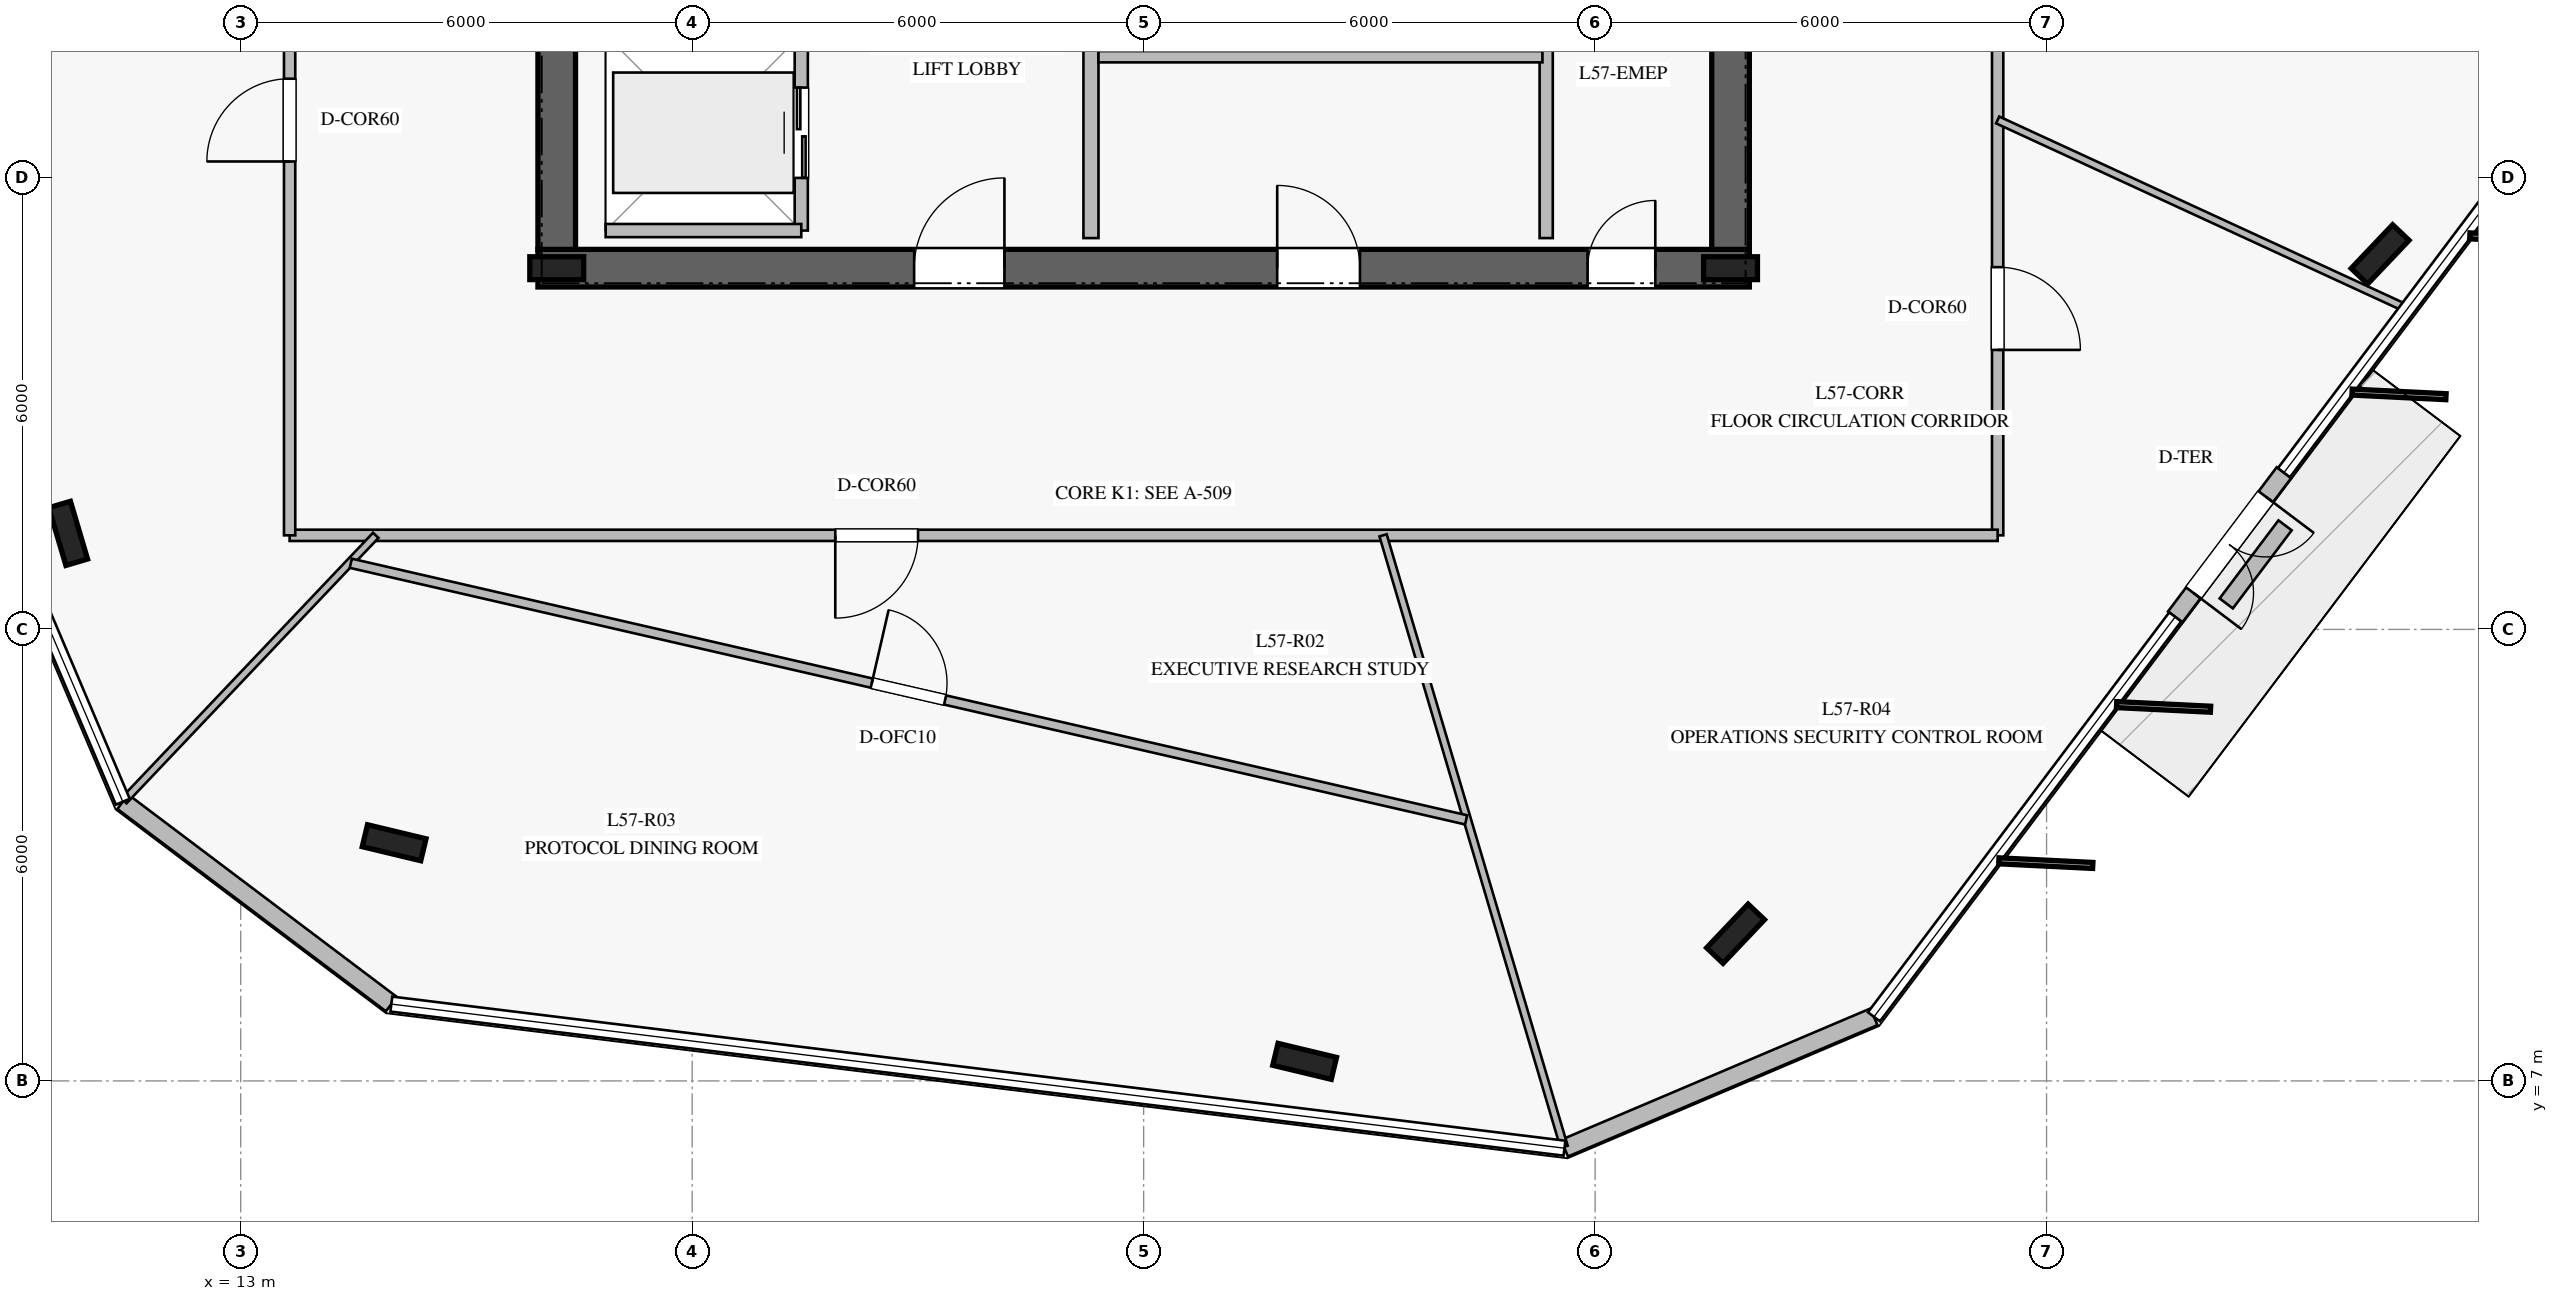
"""IFC4 building model, lengths in metres.
Left out: names, types, materials, properties, quantities, classifications, styles, units other than length and angle.
Written with IfcOpenShell. Run it as: python <this file> out.ifc"""

import sys

from ifc_helpers import new_model, si_unit, direction, frame, frame_2d, origin, origin_2d, place, context, subcontext, project, spatial, rectangle, i_section, extrude, element, fill, save


model = new_model("IFC4")
c1 = context("Model", 3, precision=1e-05, world=origin(), true_north=direction((0.0, 1.0)))
c2 = subcontext(c1, "Body", "Model", "MODEL_VIEW")
j1 = project(units=[si_unit("LENGTHUNIT", "METRE"), si_unit("PLANEANGLEUNIT", "RADIAN")], contexts=[c1])
p1 = place(None, origin())
s1 = spatial("IfcSite", under=j1, at=p1, CompositionType="ELEMENT")
p2 = place(p1, origin())
s2 = spatial("IfcBuilding", under=s1, at=p2, CompositionType="ELEMENT")
p3 = place(p2, frame((0.0, 0.0, 236.8)))
s3 = spatial("IfcBuildingStorey", under=s2, at=p3, CompositionType="ELEMENT", Elevation=236.8)
p4 = place(p3, frame((16.95, 17.8, 0.0), z_axis=(0.0, 0.0, 1.0), x_axis=(1.0, 0.0, 0.0)))
e1 = element("IfcWall", 1, at=p4, inside=s3, PredefinedType="SHEAR", context=c2, shape_type="SweptSolid", body=[
    extrude(rectangle(XDim=16.1, YDim=0.5, at=frame_2d((8.05, 0.0))), origin(), (0.0, 0.0, 1.0), 3.78),
])
p5 = place(p4, frame((5.0, 0.0, 0.0)))
e2 = element("IfcOpeningElement", 2, at=p5, cuts=e1, PredefinedType="OPENING", context=c2, shape_type="SweptSolid", body=[
    extrude(rectangle(XDim=1.2, YDim=2.25, at=frame_2d((0.6, 1.125))), frame((0.0, 0.26, 0.0), z_axis=(0.0, -1.0, 0.0), x_axis=(1.0, 0.0, 0.0)), (0.0, 0.0, 1.0), 0.52),
])
p6 = place(p4, frame((13.95, 0.0, 0.0)))
e3 = element("IfcOpeningElement", 3, at=p6, cuts=e1, PredefinedType="OPENING", context=c2, shape_type="SweptSolid", body=[
    extrude(rectangle(XDim=0.9, YDim=2.1, at=frame_2d((0.45, 1.05))), frame((0.0, 0.26, 0.0), z_axis=(0.0, -1.0, 0.0), x_axis=(1.0, 0.0, 0.0)), (0.0, 0.0, 1.0), 0.52),
])
p7 = place(p4, frame((9.825, 0.0, 0.0)))
e4 = element("IfcOpeningElement", 4, at=p7, cuts=e1, PredefinedType="OPENING", context=c2, shape_type="SweptSolid", body=[
    extrude(rectangle(XDim=1.1, YDim=2.2, at=frame_2d((0.55, 1.1))), frame((0.0, 0.26, 0.0), z_axis=(0.0, -1.0, 0.0), x_axis=(1.0, 0.0, 0.0)), (0.0, 0.0, 1.0), 0.52),
])
p8 = place(p3, frame((17.2, 31.95, 0.0), z_axis=(0.0, 0.0, 1.0), x_axis=(0.0, -1.0, 0.0)))
e5 = element("IfcWall", 5, at=p8, inside=s3, PredefinedType="SHEAR", context=c2, shape_type="SweptSolid", body=[
    extrude(rectangle(XDim=13.9, YDim=0.5, at=frame_2d((6.95, 0.0))), origin(), (0.0, 0.0, 1.0), 3.78),
])
p9 = place(p8, frame((2.1, 0.0, 0.0)))
e6 = element("IfcOpeningElement", 6, at=p9, cuts=e5, PredefinedType="OPENING", context=c2, shape_type="SweptSolid", body=[
    extrude(rectangle(XDim=1.5, YDim=2.2, at=frame_2d((0.75, 1.1))), frame((0.0, 0.26, 0.0), z_axis=(0.0, -1.0, 0.0), x_axis=(1.0, 0.0, 0.0)), (0.0, 0.0, 1.0), 0.52),
])
p10 = place(p3, frame((32.8, 18.05, 0.0), z_axis=(0.0, 0.0, 1.0), x_axis=(0.0, 1.0, 0.0)))
e7 = element("IfcWall", 7, at=p10, inside=s3, PredefinedType="SHEAR", context=c2, shape_type="SweptSolid", body=[
    extrude(rectangle(XDim=13.9, YDim=0.5, at=frame_2d((6.95, 0.0))), origin(), (0.0, 0.0, 1.0), 3.78),
])
for number, where, z_axis, x_axis in (
    (8, (17.2, 17.8, 0.0), (0.0, 0.0, 1.0), (1.0, 0.0, 0.0)),
    (9, (32.8, 17.8, 0.0), (0.0, 0.0, 1.0), (1.0, 0.0, 0.0)),
):
    element("IfcColumn", number, at=place(p3, frame(where, z_axis=z_axis, x_axis=x_axis)), inside=s3, PredefinedType="COLUMN", context=c2, shape_type="SweptSolid", body=[
        extrude(i_section(OverallWidth=0.304, OverallDepth=0.716, WebThickness=0.021, FlangeThickness=0.04, at=origin_2d()), origin(), (0.0, 0.0, 1.0), 4.0),
    ])
for number, where, z_axis, x_axis in (
    (10, (10.707, 14.276, 0.0), (0.0, 0.0, 1.0), (-0.284, 0.959, 0.0)),
    (11, (15.039, 10.165, 0.0), (0.0, 0.0, 1.0), (-0.972, 0.233, 0.0)),
    (12, (27.14, 7.26, 0.0), (0.0, 0.0, 1.0), (-0.972, 0.233, 0.0)),
    (13, (32.867, 8.956, 0.0), (0.0, 0.0, 1.0), (0.688, 0.725, 0.0)),
    (14, (41.433, 17.984, 0.0), (0.0, 0.0, 1.0), (0.688, 0.725, 0.0)),
):
    element("IfcColumn", number, at=place(p3, frame(where, z_axis=z_axis, x_axis=x_axis)), inside=s3, PredefinedType="COLUMN", context=c2, shape_type="SweptSolid", body=[
        extrude(i_section(OverallWidth=0.3, OverallDepth=0.8, WebThickness=0.018, FlangeThickness=0.033, at=origin_2d()), origin(), (0.0, 0.0, 1.0), 4.0),
    ])
p11 = place(p3, frame((11.433, 10.71, 0.0), z_axis=(0.0, 0.0, 1.0), x_axis=(0.798673666817, -0.601764384069, 0.0)))
e15 = element("IfcWall", 15, at=p11, inside=s3, PredefinedType="STANDARD", context=c2, shape_type="SweptSolid", body=[
    extrude(rectangle(XDim=4.469, YDim=0.24, at=frame_2d((2.234, 0.0))), origin(), (0.0, 0.0, 1.0), 3.78),
])
p12 = place(p3, frame((30.593, 6.106, 0.0), z_axis=(0.0, 0.0, 1.0), x_axis=(0.92048770115, 0.390771534316, 0.0)))
e16 = element("IfcWall", 16, at=p12, inside=s3, PredefinedType="STANDARD", context=c2, shape_type="SweptSolid", body=[
    extrude(rectangle(XDim=4.468, YDim=0.24, at=frame_2d((2.234, 0.0))), origin(), (0.0, 0.0, 1.0), 3.78),
])
p13 = place(p3, frame((38.71, 13.166, 0.0), z_axis=(0.0, 0.0, 1.0), x_axis=(0.601950815561, 0.798533165025, 0.0)))
e17 = element("IfcWall", 17, at=p13, inside=s3, PredefinedType="STANDARD", context=c2, shape_type="SweptSolid", body=[
    extrude(rectangle(XDim=2.401, YDim=0.24, at=frame_2d((1.2, 0.0))), origin(), (0.0, 0.0, 1.0), 3.78),
])
p14 = place(p13, frame((0.4, 0.0, 0.0)))
e18 = element("IfcOpeningElement", 18, at=p14, cuts=e17, PredefinedType="OPENING", context=c2, shape_type="SweptSolid", body=[
    extrude(rectangle(XDim=1.6, YDim=2.25, at=frame_2d((0.8, 1.125))), frame((0.0, 0.13, 0.0), z_axis=(0.0, -1.0, 0.0), x_axis=(1.0, 0.0, 0.0)), (0.0, 0.0, 1.0), 0.26),
])
p15 = place(p3, frame((39.388, 13.345, 0.0), z_axis=(0.0, 0.0, 1.0), x_axis=(0.601681803176, 0.798735881081, 0.0)))
e19 = element("IfcWall", 19, at=p15, inside=s3, PredefinedType="USERDEFINED", context=c2, shape_type="SweptSolid", body=[
    extrude(rectangle(XDim=1.3, YDim=0.22, at=frame_2d((0.65, 0.0))), origin(), (0.0, 0.0, 1.0), 0.4),
])
p16 = place(p3, frame((24.3, 18.2, 0.0), z_axis=(0.0, 0.0, 1.0), x_axis=(0.0, 1.0, 0.0)))
e20 = element("IfcWall", 20, at=p16, inside=s3, PredefinedType="PARTITIONING", context=c2, shape_type="SweptSolid", body=[
    extrude(rectangle(XDim=5.15, YDim=0.2, at=frame_2d((2.575, 0.0))), origin(), (0.0, 0.0, 1.0), 3.78),
])
p17 = place(p3, frame((30.35, 18.2, 0.0), z_axis=(0.0, 0.0, 1.0), x_axis=(0.0, 1.0, 0.0)))
e21 = element("IfcWall", 21, at=p17, inside=s3, PredefinedType="PARTITIONING", context=c2, shape_type="SweptSolid", body=[
    extrude(rectangle(XDim=3.48, YDim=0.175, at=frame_2d((1.74, 0.0))), origin(), (0.0, 0.0, 1.0), 3.78),
])
p18 = place(p3, frame((24.4, 20.61, 0.0), z_axis=(0.0, 0.0, 1.0), x_axis=(1.0, 0.0, 0.0)))
e22 = element("IfcWall", 22, at=p18, inside=s3, PredefinedType="PARTITIONING", context=c2, shape_type="SweptSolid", body=[
    extrude(rectangle(XDim=5.9, YDim=0.15, at=frame_2d((2.95, 0.0))), origin(), (0.0, 0.0, 1.0), 3.78),
])
p19 = place(p3, frame((20.45, 18.3, 0.0), z_axis=(0.0, 0.0, 1.0), x_axis=(0.0, 1.0, 0.0)))
e23 = element("IfcWall", 23, at=p19, inside=s3, PredefinedType="PARTITIONING", context=c2, shape_type="SweptSolid", body=[
    extrude(rectangle(XDim=2.6, YDim=0.175, at=frame_2d((1.3, 0.0))), origin(), (0.0, 0.0, 1.0), 3.78),
])
p20 = place(p19, frame((0.7, 0.0, 0.0)))
e24 = element("IfcOpeningElement", 24, at=p20, cuts=e23, PredefinedType="OPENING", context=c2, shape_type="SweptSolid", body=[
    extrude(rectangle(XDim=1.2, YDim=2.2, at=frame_2d((0.6, 1.1))), frame((0.0, 0.098, 0.0), z_axis=(0.0, -1.0, 0.0), x_axis=(1.0, 0.0, 0.0)), (0.0, 0.0, 1.0), 0.195),
])
p21 = place(p3, frame((17.85, 18.3, 0.0), z_axis=(0.0, 0.0, 1.0), x_axis=(1.0, 0.0, 0.0)))
e25 = element("IfcWall", 25, at=p21, inside=s3, PredefinedType="PARTITIONING", context=c2, shape_type="SweptSolid", body=[
    extrude(rectangle(XDim=2.6, YDim=0.175, at=frame_2d((1.3, 0.0))), origin(), (0.0, 0.0, 1.0), 3.78),
])
p22 = place(p3, frame((36.35, 35.75, 0.0), z_axis=(0.0, 0.0, 1.0), x_axis=(0.0, -1.0, 0.0)))
e26 = element("IfcWall", 26, at=p22, inside=s3, PredefinedType="PARTITIONING", context=c2, shape_type="SweptSolid", body=[
    extrude(rectangle(XDim=21.5, YDim=0.15, at=frame_2d((10.75, 0.0))), origin(), (0.0, 0.0, 1.0), 3.02),
])
p23 = place(p22, frame((17.936, 0.0, 0.0)))
e27 = element("IfcOpeningElement", 27, at=p23, cuts=e26, PredefinedType="OPENING", context=c2, shape_type="SweptSolid", body=[
    extrude(rectangle(XDim=1.1, YDim=2.2, at=frame_2d((0.55, 1.1))), frame((0.0, 0.085, 0.0), z_axis=(0.0, -1.0, 0.0), x_axis=(1.0, 0.0, 0.0)), (0.0, 0.0, 1.0), 0.17),
])
p24 = place(p22, frame((9.363, 0.0, 0.0)))
e28 = element("IfcOpeningElement", 28, at=p24, cuts=e26, PredefinedType="OPENING", context=c2, shape_type="SweptSolid", body=[
    extrude(rectangle(XDim=1.1, YDim=2.2, at=frame_2d((0.55, 1.1))), frame((0.0, 0.085, 0.0), z_axis=(0.0, -1.0, 0.0), x_axis=(1.0, 0.0, 0.0)), (0.0, 0.0, 1.0), 0.17),
])
p25 = place(p3, frame((36.35, 14.25, 0.0), z_axis=(0.0, 0.0, 1.0), x_axis=(-1.0, 0.0, 0.0)))
e29 = element("IfcWall", 29, at=p25, inside=s3, PredefinedType="PARTITIONING", context=c2, shape_type="SweptSolid", body=[
    extrude(rectangle(XDim=22.7, YDim=0.15, at=frame_2d((11.35, 0.0))), origin(), (0.0, 0.0, 1.0), 3.02),
])
p26 = place(p25, frame((14.348, 0.0, 0.0)))
e30 = element("IfcOpeningElement", 30, at=p26, cuts=e29, PredefinedType="OPENING", context=c2, shape_type="SweptSolid", body=[
    extrude(rectangle(XDim=1.1, YDim=2.2, at=frame_2d((0.55, 1.1))), frame((0.0, 0.085, 0.0), z_axis=(0.0, -1.0, 0.0), x_axis=(1.0, 0.0, 0.0)), (0.0, 0.0, 1.0), 0.17),
])
p27 = place(p3, frame((13.65, 14.25, 0.0), z_axis=(0.0, 0.0, 1.0), x_axis=(0.0, 1.0, 0.0)))
e31 = element("IfcWall", 31, at=p27, inside=s3, PredefinedType="PARTITIONING", context=c2, shape_type="SweptSolid", body=[
    extrude(rectangle(XDim=21.5, YDim=0.15, at=frame_2d((10.75, 0.0))), origin(), (0.0, 0.0, 1.0), 3.28),
])
p28 = place(p27, frame((4.968, 0.0, 0.0)))
e32 = element("IfcOpeningElement", 32, at=p28, cuts=e31, PredefinedType="OPENING", context=c2, shape_type="SweptSolid", body=[
    extrude(rectangle(XDim=1.1, YDim=2.2, at=frame_2d((0.55, 1.1))), frame((0.0, 0.085, 0.0), z_axis=(0.0, -1.0, 0.0), x_axis=(1.0, 0.0, 0.0)), (0.0, 0.0, 1.0), 0.17),
])
p29 = place(p27, frame((15.44, 0.0, 0.0)))
e33 = element("IfcOpeningElement", 33, at=p29, cuts=e31, PredefinedType="OPENING", context=c2, shape_type="SweptSolid", body=[
    extrude(rectangle(XDim=1.1, YDim=2.2, at=frame_2d((0.55, 1.1))), frame((0.0, 0.085, 0.0), z_axis=(0.0, -1.0, 0.0), x_axis=(1.0, 0.0, 0.0)), (0.0, 0.0, 1.0), 0.17),
])
p30 = place(p3, frame((14.795, 14.25, 0.0), z_axis=(0.0, 0.0, 1.0), x_axis=(-0.688547593197, -0.725191155422, 0.0)))
e34 = element("IfcWall", 34, at=p30, inside=s3, PredefinedType="MOVABLE", context=c2, shape_type="SweptSolid", body=[
    extrude(rectangle(XDim=4.864, YDim=0.1, at=frame_2d((2.432, 0.0))), origin(), (0.0, 0.0, 1.0), 3.18),
])
p31 = place(p3, frame((28.182, 14.25, 0.0), z_axis=(0.0, 0.0, 1.0), x_axis=(0.28390490375, -0.958852442051, 0.0)))
e35 = element("IfcWall", 35, at=p31, inside=s3, PredefinedType="MOVABLE", context=c2, shape_type="SweptSolid", body=[
    extrude(rectangle(XDim=8.475, YDim=0.1, at=frame_2d((4.237, 0.0))), origin(), (0.0, 0.0, 1.0), 3.05),
])
p32 = place(p3, frame((36.35, 19.77, 0.0), z_axis=(0.0, 0.0, 1.0), x_axis=(0.90822453429, -0.418483207923, 0.0)))
e36 = element("IfcWall", 36, at=p32, inside=s3, PredefinedType="MOVABLE", context=c2, shape_type="SweptSolid", body=[
    extrude(rectangle(XDim=5.979, YDim=0.1, at=frame_2d((2.989, 0.0))), origin(), (0.0, 0.0, 1.0), 3.18),
])
p33 = place(p3, frame((14.463, 13.879, 0.0), z_axis=(0.0, 0.0, 1.0), x_axis=(0.974546244814, -0.224186566768, 0.0)))
e37 = element("IfcWall", 37, at=p33, inside=s3, PredefinedType="PARTITIONING", context=c2, shape_type="SweptSolid", body=[
    extrude(rectangle(XDim=15.21, YDim=0.125, at=frame_2d((7.605, 0.0))), origin(), (0.0, 0.0, 1.0), 3.25),
])
p34 = place(p33, frame((7.105, 0.0, 0.0)))
e38 = element("IfcOpeningElement", 38, at=p34, cuts=e37, PredefinedType="OPENING", context=c2, shape_type="SweptSolid", body=[
    extrude(rectangle(XDim=1.0, YDim=2.15, at=frame_2d((0.5, 1.075))), frame((0.0, 0.073, 0.0), z_axis=(0.0, -1.0, 0.0), x_axis=(1.0, 0.0, 0.0)), (0.0, 0.0, 1.0), 0.145),
])
p35 = place(p14, frame((1.6, 0.0, 0.0), z_axis=(0.0, 0.0, 1.0), x_axis=(-1.0, 0.0, 0.0)))
e39 = element("IfcDoor", 39, at=p35, inside=s3, OperationType="DOUBLE_DOOR_SINGLE_SWING", PredefinedType="DOOR", context=c2, shape_type="SweptSolid", body=[
    extrude(rectangle(XDim=1.6, YDim=2.25, at=frame_2d((0.8, 1.125))), frame((0.0, 0.025, 0.0), z_axis=(0.0, -1.0, 0.0), x_axis=(1.0, 0.0, 0.0)), (0.0, 0.0, 1.0), 0.05),
])
fill(e18, e39)
p36 = place(p5, origin())
e40 = element("IfcDoor", 40, at=p36, inside=s3, OperationType="SINGLE_SWING_RIGHT", PredefinedType="DOOR", context=c2, shape_type="SweptSolid", body=[
    extrude(rectangle(XDim=1.2, YDim=2.25, at=frame_2d((0.6, 1.125))), frame((0.0, 0.025, 0.0), z_axis=(0.0, -1.0, 0.0), x_axis=(1.0, 0.0, 0.0)), (0.0, 0.0, 1.0), 0.05),
])
fill(e2, e40)
p37 = place(p6, origin())
e41 = element("IfcDoor", 41, at=p37, inside=s3, OperationType="SINGLE_SWING_RIGHT", PredefinedType="DOOR", context=c2, shape_type="SweptSolid", body=[
    extrude(rectangle(XDim=0.9, YDim=2.1, at=frame_2d((0.45, 1.05))), frame((0.0, 0.025, 0.0), z_axis=(0.0, -1.0, 0.0), x_axis=(1.0, 0.0, 0.0)), (0.0, 0.0, 1.0), 0.05),
])
fill(e3, e41)
p38 = place(p7, origin())
e42 = element("IfcDoor", 42, at=p38, inside=s3, OperationType="SINGLE_SWING_LEFT", PredefinedType="DOOR", context=c2, shape_type="SweptSolid", body=[
    extrude(rectangle(XDim=1.1, YDim=2.2, at=frame_2d((0.55, 1.1))), frame((0.0, 0.025, 0.0), z_axis=(0.0, -1.0, 0.0), x_axis=(1.0, 0.0, 0.0)), (0.0, 0.0, 1.0), 0.05),
])
fill(e4, e42)
p39 = place(p20, origin())
e43 = element("IfcDoor", 43, at=p39, inside=s3, OperationType="DOUBLE_DOOR_SLIDING", PredefinedType="DOOR", context=c2, shape_type="SweptSolid", body=[
    extrude(rectangle(XDim=1.2, YDim=2.2, at=frame_2d((0.6, 1.1))), frame((0.0, 0.025, 0.0), z_axis=(0.0, -1.0, 0.0), x_axis=(1.0, 0.0, 0.0)), (0.0, 0.0, 1.0), 0.05),
])
fill(e24, e43)
p40 = place(p28, origin())
e44 = element("IfcDoor", 44, at=p40, inside=s3, OperationType="SINGLE_SWING_LEFT", PredefinedType="DOOR", context=c2, shape_type="SweptSolid", body=[
    extrude(rectangle(XDim=1.1, YDim=2.2, at=frame_2d((0.55, 1.1))), frame((0.0, 0.025, 0.0), z_axis=(0.0, -1.0, 0.0), x_axis=(1.0, 0.0, 0.0)), (0.0, 0.0, 1.0), 0.05),
])
fill(e32, e44)
p41 = place(p26, origin())
e45 = element("IfcDoor", 45, at=p41, inside=s3, OperationType="SINGLE_SWING_RIGHT", PredefinedType="DOOR", context=c2, shape_type="SweptSolid", body=[
    extrude(rectangle(XDim=1.1, YDim=2.2, at=frame_2d((0.55, 1.1))), frame((0.0, 0.025, 0.0), z_axis=(0.0, -1.0, 0.0), x_axis=(1.0, 0.0, 0.0)), (0.0, 0.0, 1.0), 0.05),
])
fill(e30, e45)
p42 = place(p34, origin())
e46 = element("IfcDoor", 46, at=p42, inside=s3, OperationType="SINGLE_SWING_LEFT", PredefinedType="DOOR", context=c2, shape_type="SweptSolid", body=[
    extrude(rectangle(XDim=1.0, YDim=2.15, at=frame_2d((0.5, 1.075))), frame((0.0, 0.025, 0.0), z_axis=(0.0, -1.0, 0.0), x_axis=(1.0, 0.0, 0.0)), (0.0, 0.0, 1.0), 0.05),
])
fill(e38, e46)
p43 = place(p23, origin())
e47 = element("IfcDoor", 47, at=p43, inside=s3, OperationType="SINGLE_SWING_RIGHT", PredefinedType="DOOR", context=c2, shape_type="SweptSolid", body=[
    extrude(rectangle(XDim=1.1, YDim=2.2, at=frame_2d((0.55, 1.1))), frame((0.0, 0.025, 0.0), z_axis=(0.0, -1.0, 0.0), x_axis=(1.0, 0.0, 0.0)), (0.0, 0.0, 1.0), 0.05),
])
fill(e27, e47)
save(model, sys.argv[1])
